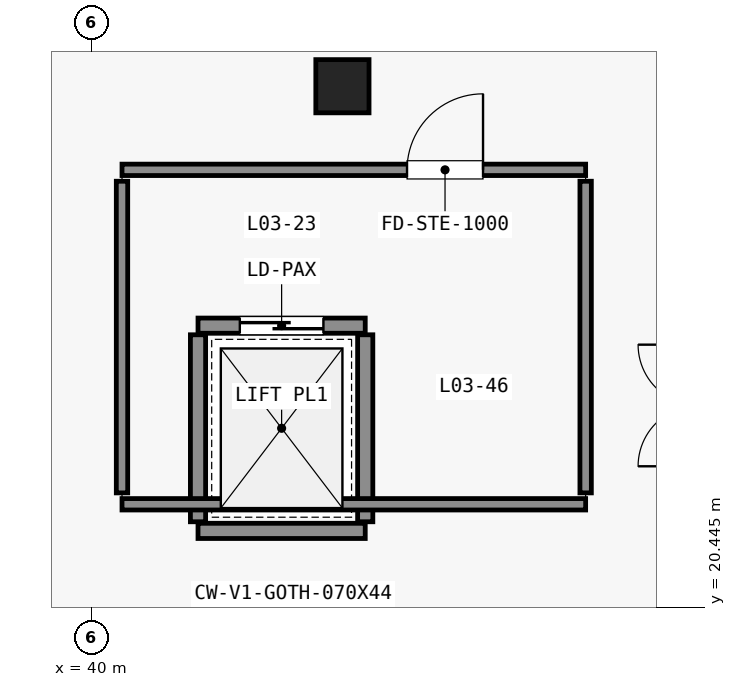
"""IFC4 building model, lengths in metres.
Left out: names, types, materials, properties, quantities, classifications, styles, units other than length and angle.
Written with IfcOpenShell. Run it as: python <this file> out.ifc"""

import sys

from ifc_helpers import new_model, si_unit, direction, frame, frame_2d, origin, origin_2d, place, context, subcontext, project, spatial, rectangle, extrude, element, fill, save


model = new_model("IFC4")
c1 = context("Model", 3, precision=1e-05, world=origin(), true_north=direction((0.0, 1.0)))
c2 = subcontext(c1, "Body", "Model", "MODEL_VIEW")
j1 = project(units=[si_unit("LENGTHUNIT", "METRE"), si_unit("PLANEANGLEUNIT", "RADIAN")], contexts=[c1])
p1 = place(None, origin())
s1 = spatial("IfcSite", under=j1, at=p1, CompositionType="ELEMENT")
p2 = place(p1, origin())
s2 = spatial("IfcBuilding", under=s1, at=p2, CompositionType="ELEMENT")
p3 = place(p2, frame((0.0, 0.0, 16.2)))
s3 = spatial("IfcBuildingStorey", under=s2, at=p3, CompositionType="ELEMENT", Elevation=16.2)
p4 = place(p3, frame((43.3, 27.3, 0.0), z_axis=(0.0, 0.0, 1.0), x_axis=(1.0, 0.0, 0.0)))
e1 = element("IfcColumn", 1, at=p4, inside=s3, PredefinedType="COLUMN", context=c2, shape_type="SweptSolid", body=[
    extrude(rectangle(XDim=0.7, YDim=0.7, at=origin_2d()), origin(), (0.0, 0.0, 1.0), 3.25),
])
p5 = place(p3, frame((41.4, 21.45, 0.0), z_axis=(0.0, 0.0, 1.0), x_axis=(1.0, 0.0, 0.0)))
e2 = element("IfcWall", 2, at=p5, inside=s3, PredefinedType="STANDARD", context=c2, shape_type="SweptSolid", body=[
    extrude(rectangle(XDim=2.2, YDim=0.2, at=frame_2d((1.1, 0.0))), origin(), (0.0, 0.0, 1.0), 4.44),
])
p6 = place(p3, frame((41.4, 24.15, 0.0), z_axis=(0.0, 0.0, 1.0), x_axis=(1.0, 0.0, 0.0)))
e3 = element("IfcWall", 3, at=p6, inside=s3, PredefinedType="STANDARD", context=c2, shape_type="SweptSolid", body=[
    extrude(rectangle(XDim=2.2, YDim=0.2, at=frame_2d((1.1, 0.0))), origin(), (0.0, 0.0, 1.0), 4.44),
])
p7 = place(p6, frame((0.55, 0.0, 0.0)))
e4 = element("IfcOpeningElement", 4, at=p7, cuts=e3, PredefinedType="OPENING", context=c2, shape_type="SweptSolid", body=[
    extrude(rectangle(XDim=1.1, YDim=2.15, at=frame_2d((0.55, 1.075))), frame((0.0, 0.11, 0.0), z_axis=(0.0, -1.0, 0.0), x_axis=(1.0, 0.0, 0.0)), (0.0, 0.0, 1.0), 0.22),
])
for number, where, z_axis, x_axis in (
    (5, (41.4, 21.57, 0.0), (0.0, 0.0, 1.0), (0.0, 1.0, 0.0)),
    (6, (43.6, 21.57, 0.0), (0.0, 0.0, 1.0), (0.0, 1.0, 0.0)),
):
    element("IfcWall", number, at=place(p3, frame(where, z_axis=z_axis, x_axis=x_axis)), inside=s3, PredefinedType="STANDARD", context=c2, shape_type="SweptSolid", body=[
        extrude(rectangle(XDim=2.46, YDim=0.2, at=frame_2d((1.23, 0.0))), origin(), (0.0, 0.0, 1.0), 4.44),
    ])
p8 = place(p3, frame((40.4, 21.8, 0.0), z_axis=(0.0, 0.0, 1.0), x_axis=(1.0, 0.0, 0.0)))
e7 = element("IfcWall", 7, at=p8, inside=s3, PredefinedType="STANDARD", context=c2, shape_type="SweptSolid", body=[
    extrude(rectangle(XDim=6.1, YDim=0.15, at=frame_2d((3.05, 0.0))), origin(), (0.0, 0.0, 1.0), 4.44),
])
p9 = place(p3, frame((40.4, 26.2, 0.0), z_axis=(0.0, 0.0, 1.0), x_axis=(1.0, 0.0, 0.0)))
e8 = element("IfcWall", 8, at=p9, inside=s3, PredefinedType="STANDARD", context=c2, shape_type="SweptSolid", body=[
    extrude(rectangle(XDim=6.1, YDim=0.15, at=frame_2d((3.05, 0.0))), origin(), (0.0, 0.0, 1.0), 4.44),
])
p10 = place(p9, frame((3.75, 0.0, 0.0)))
e9 = element("IfcOpeningElement", 9, at=p10, cuts=e8, PredefinedType="OPENING", context=c2, shape_type="SweptSolid", body=[
    extrude(rectangle(XDim=1.0, YDim=2.15, at=frame_2d((0.5, 1.075))), frame((0.0, 0.085, 0.0), z_axis=(0.0, -1.0, 0.0), x_axis=(1.0, 0.0, 0.0)), (0.0, 0.0, 1.0), 0.17),
])
for number, where, z_axis, x_axis in (
    (10, (40.4, 21.95, 0.0), (0.0, 0.0, 1.0), (0.0, 1.0, 0.0)),
    (11, (46.5, 21.95, 0.0), (0.0, 0.0, 1.0), (0.0, 1.0, 0.0)),
):
    element("IfcWall", number, at=place(p3, frame(where, z_axis=z_axis, x_axis=x_axis)), inside=s3, PredefinedType="STANDARD", context=c2, shape_type="SweptSolid", body=[
        extrude(rectangle(XDim=4.1, YDim=0.15, at=frame_2d((2.05, 0.0))), origin(), (0.0, 0.0, 1.0), 4.44),
    ])
p11 = place(p7, origin())
e12 = element("IfcDoor", 12, at=p11, inside=s3, OperationType="SLIDING_TO_LEFT", PredefinedType="DOOR", context=c2, shape_type="SweptSolid", body=[
    extrude(rectangle(XDim=1.1, YDim=2.15, at=frame_2d((0.55, 1.075))), frame((0.0, 0.025, 0.0), z_axis=(0.0, -1.0, 0.0), x_axis=(1.0, 0.0, 0.0)), (0.0, 0.0, 1.0), 0.05),
])
fill(e4, e12)
p12 = place(p10, origin())
e13 = element("IfcDoor", 13, at=p12, inside=s3, OperationType="SINGLE_SWING_RIGHT", PredefinedType="DOOR", context=c2, shape_type="SweptSolid", body=[
    extrude(rectangle(XDim=1.0, YDim=2.15, at=frame_2d((0.5, 1.075))), frame((0.0, 0.025, 0.0), z_axis=(0.0, -1.0, 0.0), x_axis=(1.0, 0.0, 0.0)), (0.0, 0.0, 1.0), 0.05),
])
fill(e9, e13)
save(model, sys.argv[1])
